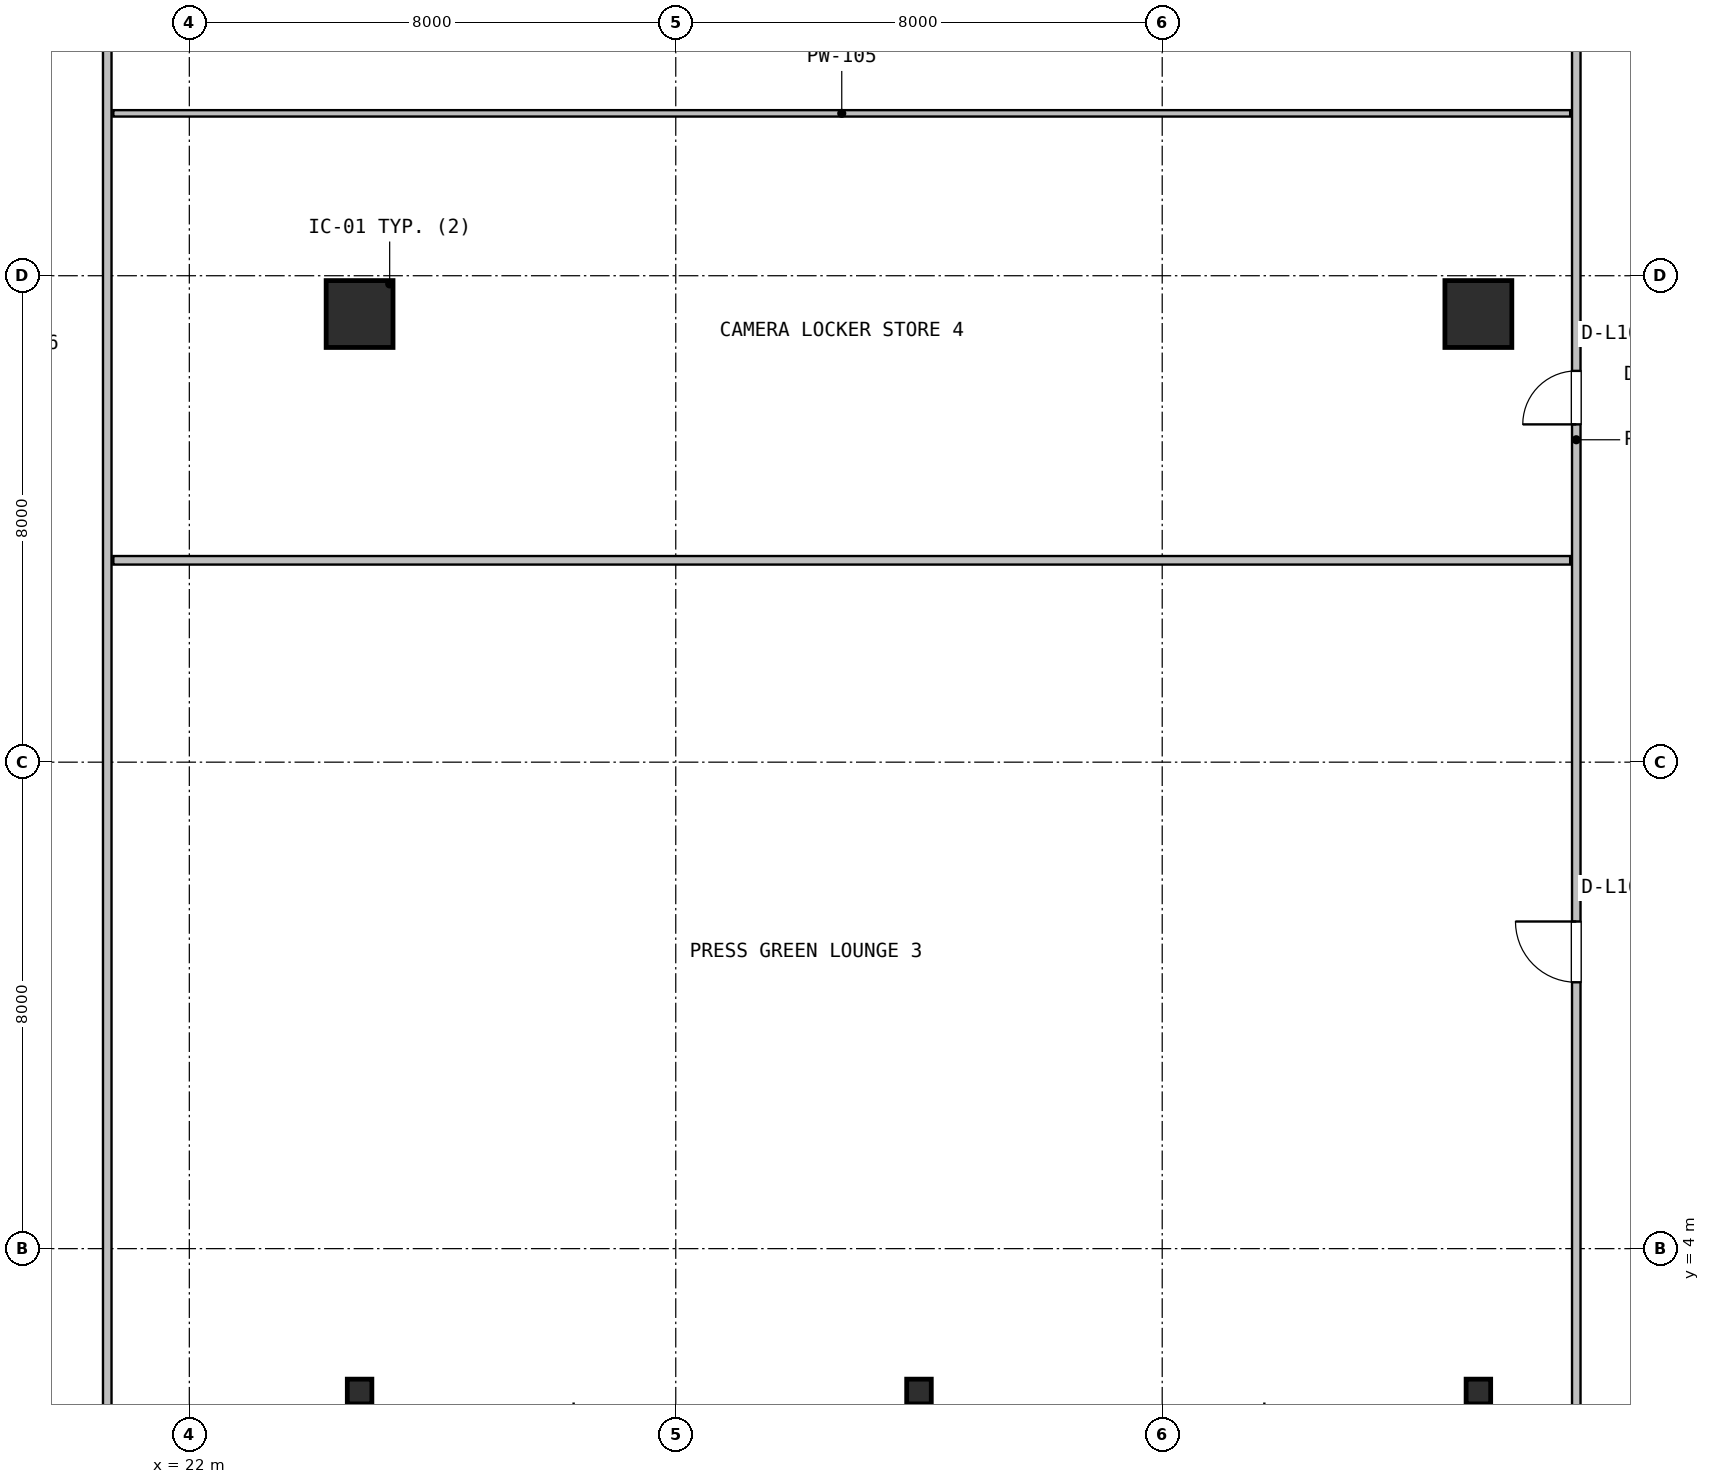
"""IFC4 building model, lengths in metres.
Left out: names, types, materials, properties, quantities, classifications, styles, units other than length and angle.
Written with IfcOpenShell. Run it as: python <this file> out.ifc"""

import sys

from ifc_helpers import new_model, si_unit, direction, frame, frame_2d, origin, origin_2d, place, context, subcontext, project, spatial, rectangle, i_section, extrude, source, transform, mapped, element, fill, save


model = new_model("IFC4")
c1 = context("Model", 3, precision=1e-05, world=origin(), true_north=direction((0.0, 1.0)))
c2 = subcontext(c1, "Body", "Model", "MODEL_VIEW")
j1 = project(units=[si_unit("LENGTHUNIT", "METRE"), si_unit("PLANEANGLEUNIT", "RADIAN")], contexts=[c1])
p1 = place(None, origin())
s1 = spatial("IfcSite", under=j1, at=p1, CompositionType="ELEMENT")
p2 = place(p1, origin())
s2 = spatial("IfcBuilding", under=s1, at=p2, CompositionType="ELEMENT")
p3 = place(p2, frame((0.0, 0.0, 70.5)))
s3 = spatial("IfcBuildingStorey", under=s2, at=p3, CompositionType="ELEMENT", Elevation=70.5)
m1 = source(origin(), c2, "Body", "SweptSolid", [
    extrude(i_section(OverallWidth=0.404, OverallDepth=0.407, WebThickness=0.027, FlangeThickness=0.044, FilletRadius=0.018, at=origin_2d()), origin(), (0.0, 0.0, 1.0), 3.9),
])
for number, where, z_axis, x_axis in (
    (1, (24.8, 1.65, 0.0), (0.0, 0.0, 1.0), (1.0, 0.0, 0.0)),
    (2, (34.0, 1.65, 0.0), (0.0, 0.0, 1.0), (1.0, 0.0, 0.0)),
    (3, (43.2, 1.65, 0.0), (0.0, 0.0, 1.0), (1.0, 0.0, 0.0)),
):
    element("IfcColumn", number, at=place(p3, frame(where, z_axis=z_axis, x_axis=x_axis)), inside=s3, PredefinedType="COLUMN", context=c2, shape_type="MappedRepresentation", body=[
        mapped(m1, transform((0.0, 0.0, 0.0), x_axis=(1.0, 0.0, 0.0), y_axis=(0.0, 1.0, 0.0), z_axis=(0.0, 0.0, 1.0), scale=1.0)),
    ])
m2 = source(origin(), c2, "Body", "SweptSolid", [
    extrude(rectangle(XDim=1.1, YDim=1.1, at=origin_2d()), origin(), (0.0, 0.0, 1.0), 3.9),
])
for number, where, z_axis, x_axis in (
    (4, (24.8, 19.37, 0.0), (0.0, 0.0, 1.0), (1.0, 0.0, 0.0)),
    (5, (43.2, 19.37, 0.0), (0.0, 0.0, 1.0), (1.0, 0.0, 0.0)),
):
    element("IfcColumn", number, at=place(p3, frame(where, z_axis=z_axis, x_axis=x_axis)), inside=s3, PredefinedType="COLUMN", context=c2, shape_type="MappedRepresentation", body=[
        mapped(m2, transform((0.0, 0.0, 0.0), x_axis=(1.0, 0.0, 0.0), y_axis=(0.0, 1.0, 0.0), z_axis=(0.0, 0.0, 1.0), scale=1.0)),
    ])
p4 = place(p3, frame((44.81, 1.38, 0.0), z_axis=(0.0, 0.0, 1.0), x_axis=(0.0, 1.0, 0.0)))
e6 = element("IfcWall", 6, at=p4, inside=s3, PredefinedType="PARTITIONING", context=c2, shape_type="SweptSolid", body=[
    extrude(rectangle(XDim=31.845, YDim=0.14, at=frame_2d((15.923, 0.0))), origin(), (0.0, 0.0, 1.0), 3.208),
])
p5 = place(p4, frame((7.0, 0.0, 0.0)))
e7 = element("IfcOpeningElement", 7, at=p5, cuts=e6, PredefinedType="OPENING", context=c2, shape_type="SweptSolid", body=[
    extrude(rectangle(XDim=1.0, YDim=2.1, at=frame_2d((0.5, 1.05))), frame((0.0, 0.08, 0.0), z_axis=(0.0, -1.0, 0.0), x_axis=(1.0, 0.0, 0.0)), (0.0, 0.0, 1.0), 0.16),
])
p6 = place(p4, frame((16.175, 0.0, 0.0)))
e8 = element("IfcOpeningElement", 8, at=p6, cuts=e6, PredefinedType="OPENING", context=c2, shape_type="SweptSolid", body=[
    extrude(rectangle(XDim=0.88, YDim=2.06, at=frame_2d((0.44, 1.03))), frame((0.0, 0.08, 0.0), z_axis=(0.0, -1.0, 0.0), x_axis=(1.0, 0.0, 0.0)), (0.0, 0.0, 1.0), 0.16),
])
p7 = place(p3, frame((20.75, 15.32, 0.0), z_axis=(0.0, 0.0, 1.0), x_axis=(1.0, 0.0, 0.0)))
e9 = element("IfcWall", 9, at=p7, inside=s3, PredefinedType="PARTITIONING", context=c2, shape_type="SweptSolid", body=[
    extrude(rectangle(XDim=23.96, YDim=0.14, at=frame_2d((11.98, 0.0))), origin(), (0.0, 0.0, 1.0), 2.852),
])
p8 = place(p3, frame((20.65, 1.38, 0.0), z_axis=(0.0, 0.0, 1.0), x_axis=(0.0, 1.0, 0.0)))
e10 = element("IfcWall", 10, at=p8, inside=s3, PredefinedType="PARTITIONING", context=c2, shape_type="SweptSolid", body=[
    extrude(rectangle(XDim=31.845, YDim=0.14, at=frame_2d((15.923, 0.0))), origin(), (0.0, 0.0, 1.0), 3.208),
])
p9 = place(p3, frame((20.75, 22.67, 0.0), z_axis=(0.0, 0.0, 1.0), x_axis=(1.0, 0.0, 0.0)))
e11 = element("IfcWall", 11, at=p9, inside=s3, PredefinedType="PARTITIONING", context=c2, shape_type="SweptSolid", body=[
    extrude(rectangle(XDim=23.96, YDim=0.105, at=frame_2d((11.98, 0.0))), origin(), (0.0, 0.0, 1.0), 2.852),
])
m3 = source(origin(), c2, "Body", "SweptSolid", [
    extrude(rectangle(XDim=1.0, YDim=2.1, at=frame_2d((0.5, 1.05))), frame((0.0, 0.025, 0.0), z_axis=(0.0, -1.0, 0.0), x_axis=(1.0, 0.0, 0.0)), (0.0, 0.0, 1.0), 0.05),
])
p10 = place(p5, origin())
e12 = element("IfcDoor", 12, at=p10, inside=s3, OperationType="SINGLE_SWING_RIGHT", PredefinedType="DOOR", context=c2, shape_type="MappedRepresentation", body=[
    mapped(m3, transform((0.0, 0.0, 0.0), x_axis=(1.0, 0.0, 0.0), y_axis=(0.0, 1.0, 0.0), z_axis=(0.0, 0.0, 1.0), scale=1.0)),
])
fill(e7, e12)
m4 = source(origin(), c2, "Body", "SweptSolid", [
    extrude(rectangle(XDim=0.88, YDim=2.06, at=frame_2d((0.44, 1.03))), frame((0.0, 0.025, 0.0), z_axis=(0.0, -1.0, 0.0), x_axis=(1.0, 0.0, 0.0)), (0.0, 0.0, 1.0), 0.05),
])
p11 = place(p6, origin())
e13 = element("IfcDoor", 13, at=p11, inside=s3, OperationType="SINGLE_SWING_LEFT", PredefinedType="DOOR", context=c2, shape_type="MappedRepresentation", body=[
    mapped(m4, transform((0.0, 0.0, 0.0), x_axis=(1.0, 0.0, 0.0), y_axis=(0.0, 1.0, 0.0), z_axis=(0.0, 0.0, 1.0), scale=1.0)),
])
fill(e8, e13)
save(model, sys.argv[1])
